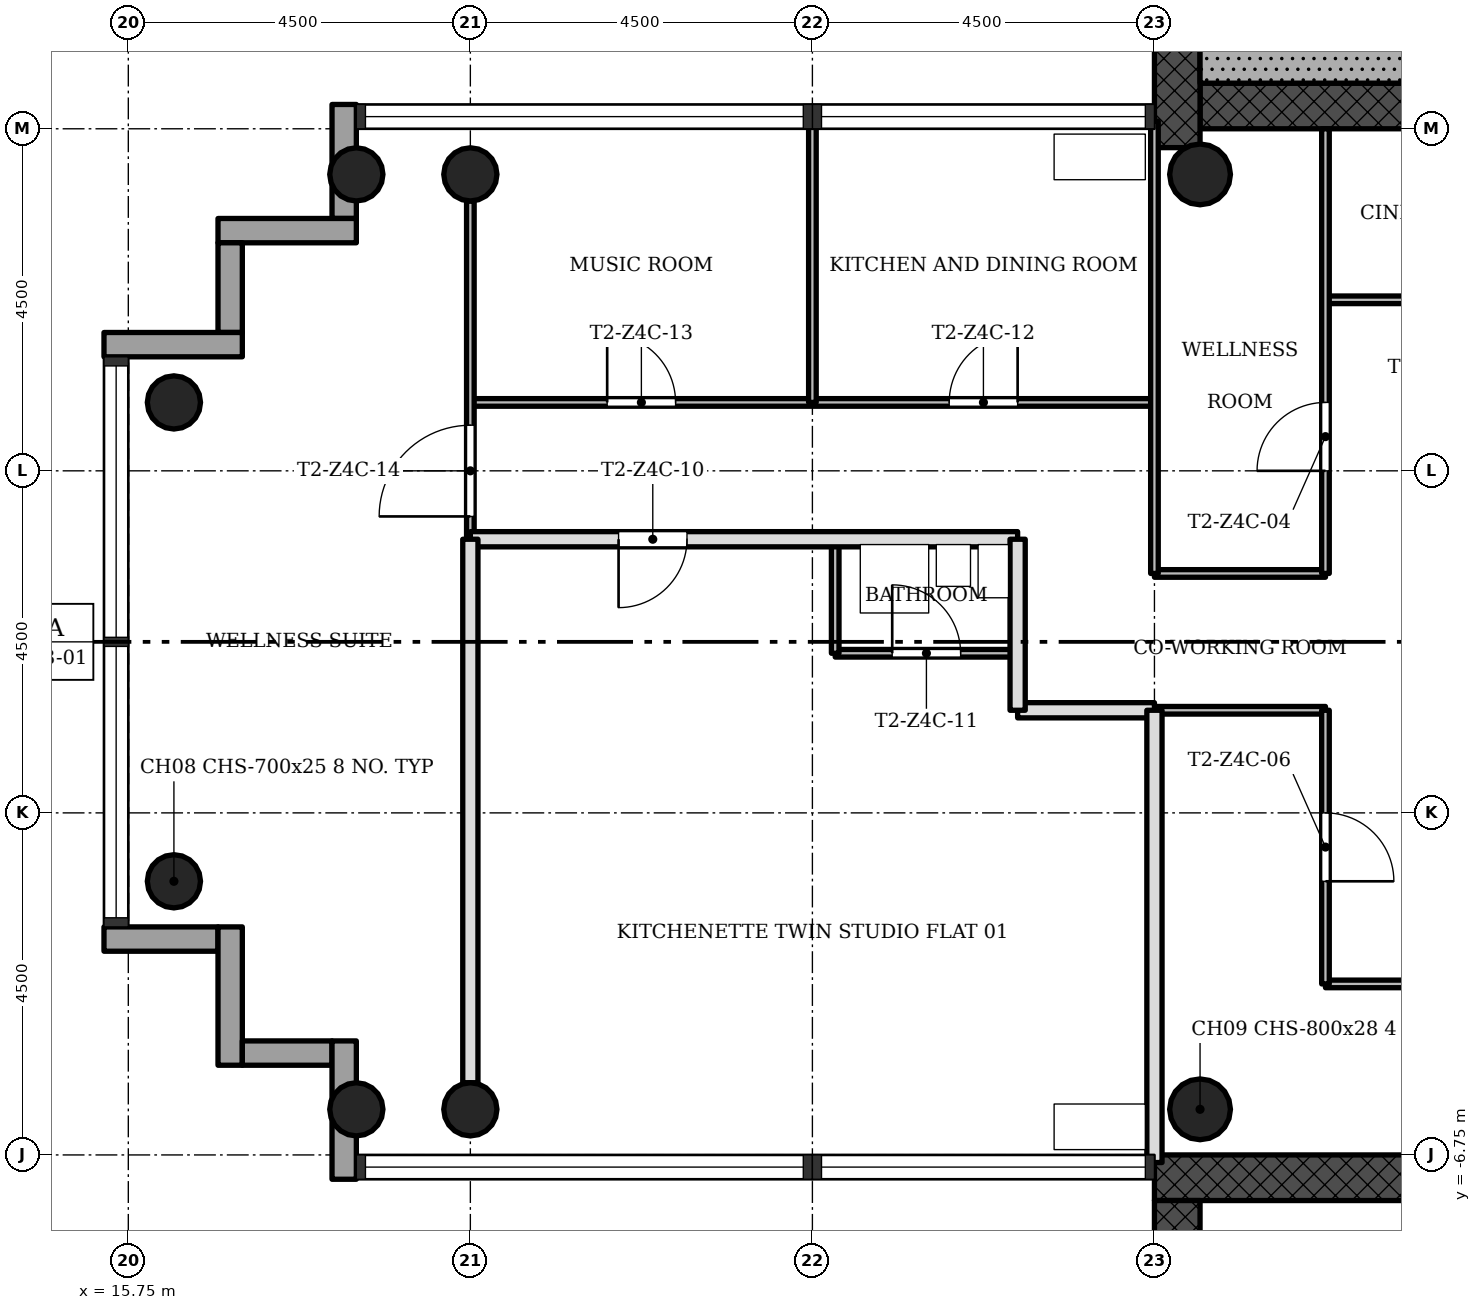
"""IFC4 building model, lengths in metres.
Left out: names, types, materials, properties, quantities, classifications, styles, units other than length and angle.
Written with IfcOpenShell. Run it as: python <this file> out.ifc"""

import sys

from ifc_helpers import new_model, si_unit, direction, frame, frame_2d, origin, origin_2d, place, context, subcontext, project, spatial, rectangle, hollow_circle, extrude, element, fill, save


model = new_model("IFC4")
c1 = context("Model", 3, precision=1e-05, world=origin(), true_north=direction((0.0, 1.0)))
c2 = subcontext(c1, "Body", "Model", "MODEL_VIEW")
j1 = project(units=[si_unit("LENGTHUNIT", "METRE"), si_unit("PLANEANGLEUNIT", "RADIAN")], contexts=[c1])
p1 = place(None, origin())
s1 = spatial("IfcSite", under=j1, at=p1, CompositionType="ELEMENT")
p2 = place(p1, origin())
s2 = spatial("IfcBuilding", under=s1, at=p2, CompositionType="ELEMENT")
p3 = place(p2, frame((0.0, 0.0, 185.8)))
s3 = spatial("IfcBuildingStorey", under=s2, at=p3, CompositionType="ELEMENT", Elevation=185.8)
p4 = place(p3, frame((29.85, 7.05, 0.0), z_axis=(0.0, 0.0, 1.0), x_axis=(1.0, 0.0, 0.0)))
e1 = element("IfcWall", 1, at=p4, inside=s3, PredefinedType="SHEAR", context=c2, shape_type="SweptSolid", body=[
    extrude(rectangle(XDim=12.9, YDim=0.6, at=frame_2d((6.45, 0.0))), origin(), (0.0, 0.0, 1.0), 3.4),
])
p5 = place(p4, frame((5.25, 0.0, 0.0)))
e2 = element("IfcOpeningElement", 2, at=p5, cuts=e1, PredefinedType="OPENING", context=c2, shape_type="SweptSolid", body=[
    extrude(rectangle(XDim=1.8, YDim=2.1, at=frame_2d((0.9, 1.05))), frame((0.0, 0.31, 0.0), z_axis=(0.0, -1.0, 0.0), x_axis=(1.0, 0.0, 0.0)), (0.0, 0.0, 1.0), 0.62),
])
p6 = place(p3, frame((29.55, 15.15, 0.0), z_axis=(0.0, 0.0, 1.0), x_axis=(0.0, -1.0, 0.0)))
e3 = element("IfcWall", 3, at=p6, inside=s3, PredefinedType="SHEAR", context=c2, shape_type="SweptSolid", body=[
    extrude(rectangle(XDim=8.648, YDim=0.6, at=frame_2d((4.324, 0.0))), origin(), (0.0, 0.0, 1.0), 3.4),
])
p7 = place(p3, frame((42.15, -7.05, 0.0), z_axis=(0.0, 0.0, 1.0), x_axis=(-1.0, 0.0, 0.0)))
e4 = element("IfcWall", 4, at=p7, inside=s3, PredefinedType="SHEAR", context=c2, shape_type="SweptSolid", body=[
    extrude(rectangle(XDim=12.9, YDim=0.6, at=frame_2d((6.45, 0.0))), origin(), (0.0, 0.0, 1.0), 3.4),
])
p8 = place(p7, frame((5.25, 0.0, 0.0)))
e5 = element("IfcOpeningElement", 5, at=p8, cuts=e4, PredefinedType="OPENING", context=c2, shape_type="SweptSolid", body=[
    extrude(rectangle(XDim=1.8, YDim=2.1, at=frame_2d((0.9, 1.05))), frame((0.0, 0.31, 0.0), z_axis=(0.0, -1.0, 0.0), x_axis=(1.0, 0.0, 0.0)), (0.0, 0.0, 1.0), 0.62),
])
p9 = place(p3, frame((29.55, -7.35, 0.0), z_axis=(0.0, 0.0, 1.0), x_axis=(0.0, -1.0, 0.0)))
e6 = element("IfcWall", 6, at=p9, inside=s3, PredefinedType="SHEAR", context=c2, shape_type="SweptSolid", body=[
    extrude(rectangle(XDim=8.4, YDim=0.6, at=frame_2d((4.2, 0.0))), origin(), (0.0, 0.0, 1.0), 3.4),
])
for number, where, z_axis, x_axis in (
    (7, (20.25, 6.15, 0.0), (0.0, 0.0, 1.0), (1.0, 0.0, 0.0)),
    (8, (20.25, -6.15, 0.0), (0.0, 0.0, 1.0), (1.0, 0.0, 0.0)),
    (9, (18.75, 6.15, 0.0), (0.0, 0.0, 1.0), (1.0, 0.0, 0.0)),
    (10, (18.75, -6.15, 0.0), (0.0, 0.0, 1.0), (1.0, 0.0, 0.0)),
    (11, (16.35, 3.15, 0.0), (0.0, 0.0, 1.0), (1.0, 0.0, 0.0)),
    (12, (16.35, -3.15, 0.0), (0.0, 0.0, 1.0), (1.0, 0.0, 0.0)),
):
    element("IfcColumn", number, at=place(p3, frame(where, z_axis=z_axis, x_axis=x_axis)), inside=s3, PredefinedType="COLUMN", context=c2, shape_type="SweptSolid", body=[
        extrude(hollow_circle(Radius=0.35, WallThickness=0.025, at=origin_2d()), origin(), (0.0, 0.0, 1.0), 3.4),
    ])
for number, where, z_axis, x_axis in (
    (13, (29.85, 6.15, 0.0), (0.0, 0.0, 1.0), (1.0, 0.0, 0.0)),
    (14, (29.85, -6.15, 0.0), (0.0, 0.0, 1.0), (1.0, 0.0, 0.0)),
):
    element("IfcColumn", number, at=place(p3, frame(where, z_axis=z_axis, x_axis=x_axis)), inside=s3, PredefinedType="COLUMN", context=c2, shape_type="SweptSolid", body=[
        extrude(hollow_circle(Radius=0.4, WallThickness=0.028, at=origin_2d()), origin(), (0.0, 0.0, 1.0), 3.4),
    ])
p10 = place(p3, frame((18.59, 7.07, -0.3), z_axis=(0.0, 0.0, 1.0), x_axis=(0.0, -1.0, 0.0)))
e15 = element("IfcWall", 15, at=p10, inside=s3, PredefinedType="STANDARD", context=c2, shape_type="SweptSolid", body=[
    extrude(rectangle(XDim=1.5, YDim=0.32, at=frame_2d((0.75, 0.0))), origin(), (0.0, 0.0, 1.0), 3.4),
])
p11 = place(p3, frame((18.75, 5.41, -0.3), z_axis=(0.0, 0.0, 1.0), x_axis=(-1.0, 0.0, 0.0)))
e16 = element("IfcWall", 16, at=p11, inside=s3, PredefinedType="STANDARD", context=c2, shape_type="SweptSolid", body=[
    extrude(rectangle(XDim=1.82, YDim=0.32, at=frame_2d((0.91, 0.0))), origin(), (0.0, 0.0, 1.0), 3.4),
])
p12 = place(p3, frame((17.09, 5.25, -0.3), z_axis=(0.0, 0.0, 1.0), x_axis=(0.0, -1.0, 0.0)))
e17 = element("IfcWall", 17, at=p12, inside=s3, PredefinedType="STANDARD", context=c2, shape_type="SweptSolid", body=[
    extrude(rectangle(XDim=1.18, YDim=0.32, at=frame_2d((0.59, 0.0))), origin(), (0.0, 0.0, 1.0), 3.4),
])
p13 = place(p3, frame((17.25, 3.91, -0.3), z_axis=(0.0, 0.0, 1.0), x_axis=(-1.0, 0.0, 0.0)))
e18 = element("IfcWall", 18, at=p13, inside=s3, PredefinedType="STANDARD", context=c2, shape_type="SweptSolid", body=[
    extrude(rectangle(XDim=1.82, YDim=0.32, at=frame_2d((0.91, 0.0))), origin(), (0.0, 0.0, 1.0), 3.4),
])
p14 = place(p3, frame((15.43, -3.91, -0.3), z_axis=(0.0, 0.0, 1.0), x_axis=(1.0, 0.0, 0.0)))
e19 = element("IfcWall", 19, at=p14, inside=s3, PredefinedType="STANDARD", context=c2, shape_type="SweptSolid", body=[
    extrude(rectangle(XDim=1.5, YDim=0.32, at=frame_2d((0.75, 0.0))), origin(), (0.0, 0.0, 1.0), 3.4),
])
p15 = place(p3, frame((17.09, -3.75, -0.3), z_axis=(0.0, 0.0, 1.0), x_axis=(0.0, -1.0, 0.0)))
e20 = element("IfcWall", 20, at=p15, inside=s3, PredefinedType="STANDARD", context=c2, shape_type="SweptSolid", body=[
    extrude(rectangle(XDim=1.82, YDim=0.32, at=frame_2d((0.91, 0.0))), origin(), (0.0, 0.0, 1.0), 3.4),
])
p16 = place(p3, frame((17.25, -5.41, -0.3), z_axis=(0.0, 0.0, 1.0), x_axis=(1.0, 0.0, 0.0)))
e21 = element("IfcWall", 21, at=p16, inside=s3, PredefinedType="STANDARD", context=c2, shape_type="SweptSolid", body=[
    extrude(rectangle(XDim=1.18, YDim=0.32, at=frame_2d((0.59, 0.0))), origin(), (0.0, 0.0, 1.0), 3.4),
])
p17 = place(p3, frame((18.59, -5.25, -0.3), z_axis=(0.0, 0.0, 1.0), x_axis=(0.0, -1.0, 0.0)))
e22 = element("IfcWall", 22, at=p17, inside=s3, PredefinedType="STANDARD", context=c2, shape_type="SweptSolid", body=[
    extrude(rectangle(XDim=1.82, YDim=0.32, at=frame_2d((0.91, 0.0))), origin(), (0.0, 0.0, 1.0), 3.4),
])
p18 = place(p3, frame((34.5, -4.5, 0.0), z_axis=(0.0, 0.0, 1.0), x_axis=(-1.0, 0.0, 0.0)))
e23 = element("IfcWall", 23, at=p18, inside=s3, PredefinedType="PARTITIONING", context=c2, shape_type="SweptSolid", body=[
    extrude(rectangle(XDim=3.0, YDim=0.1, at=frame_2d((1.5, 0.0))), origin(), (0.0, 0.0, 1.0), 3.0),
])
p19 = place(p3, frame((31.5, -0.9, 0.0), z_axis=(0.0, 0.0, 1.0), x_axis=(-1.0, 0.0, 0.0)))
e24 = element("IfcWall", 24, at=p19, inside=s3, PredefinedType="PARTITIONING", context=c2, shape_type="SweptSolid", body=[
    extrude(rectangle(XDim=2.25, YDim=0.1, at=frame_2d((1.125, 0.0))), origin(), (0.0, 0.0, 1.0), 3.0),
])
p20 = place(p3, frame((29.25, -0.9, 0.0), z_axis=(0.0, 0.0, 1.0), x_axis=(-1.0, 0.0, 0.0)))
e25 = element("IfcWall", 25, at=p20, inside=s3, PredefinedType="SOLIDWALL", context=c2, shape_type="SweptSolid", body=[
    extrude(rectangle(XDim=1.8, YDim=0.2, at=frame_2d((0.9, 0.0))), origin(), (0.0, 0.0, 1.0), 3.0),
])
p21 = place(p3, frame((27.45, -0.15, 0.0), z_axis=(0.0, 0.0, 1.0), x_axis=(-1.0, 0.0, 0.0)))
e26 = element("IfcWall", 26, at=p21, inside=s3, PredefinedType="PARTITIONING", context=c2, shape_type="SweptSolid", body=[
    extrude(rectangle(XDim=2.4, YDim=0.1, at=frame_2d((1.2, 0.0))), origin(), (0.0, 0.0, 1.0), 3.0),
])
p22 = place(p21, frame((0.75, 0.0, 0.0)))
e27 = element("IfcOpeningElement", 27, at=p22, cuts=e26, PredefinedType="OPENING", context=c2, shape_type="SweptSolid", body=[
    extrude(rectangle(XDim=0.9, YDim=2.1, at=frame_2d((0.45, 1.05))), frame((0.0, 0.06, 0.0), z_axis=(0.0, -1.0, 0.0), x_axis=(1.0, 0.0, 0.0)), (0.0, 0.0, 1.0), 0.12),
])
p23 = place(p3, frame((31.5, 0.9, 0.0), z_axis=(0.0, 0.0, 1.0), x_axis=(-1.0, 0.0, 0.0)))
e28 = element("IfcWall", 28, at=p23, inside=s3, PredefinedType="PARTITIONING", context=c2, shape_type="SweptSolid", body=[
    extrude(rectangle(XDim=2.25, YDim=0.1, at=frame_2d((1.125, 0.0))), origin(), (0.0, 0.0, 1.0), 3.0),
])
p24 = place(p3, frame((27.45, 1.35, 0.0), z_axis=(0.0, 0.0, 1.0), x_axis=(-1.0, 0.0, 0.0)))
e29 = element("IfcWall", 29, at=p24, inside=s3, PredefinedType="SOLIDWALL", context=c2, shape_type="SweptSolid", body=[
    extrude(rectangle(XDim=7.2, YDim=0.2, at=frame_2d((3.6, 0.0))), origin(), (0.0, 0.0, 1.0), 3.0),
])
p25 = place(p24, frame((4.35, 0.0, 0.0)))
e30 = element("IfcOpeningElement", 30, at=p25, cuts=e29, PredefinedType="OPENING", context=c2, shape_type="SweptSolid", body=[
    extrude(rectangle(XDim=0.9, YDim=2.1, at=frame_2d((0.45, 1.05))), frame((0.0, 0.11, 0.0), z_axis=(0.0, -1.0, 0.0), x_axis=(1.0, 0.0, 0.0)), (0.0, 0.0, 1.0), 0.22),
])
p26 = place(p3, frame((29.25, 3.15, 0.0), z_axis=(0.0, 0.0, 1.0), x_axis=(-1.0, 0.0, 0.0)))
e31 = element("IfcWall", 31, at=p26, inside=s3, PredefinedType="PARTITIONING", context=c2, shape_type="SweptSolid", body=[
    extrude(rectangle(XDim=9.0, YDim=0.1, at=frame_2d((4.5, 0.0))), origin(), (0.0, 0.0, 1.0), 3.0),
])
p27 = place(p26, frame((1.8, 0.0, 0.0)))
e32 = element("IfcOpeningElement", 32, at=p27, cuts=e31, PredefinedType="OPENING", context=c2, shape_type="SweptSolid", body=[
    extrude(rectangle(XDim=0.9, YDim=2.1, at=frame_2d((0.45, 1.05))), frame((0.0, 0.06, 0.0), z_axis=(0.0, -1.0, 0.0), x_axis=(1.0, 0.0, 0.0)), (0.0, 0.0, 1.0), 0.12),
])
p28 = place(p26, frame((6.3, 0.0, 0.0)))
e33 = element("IfcOpeningElement", 33, at=p28, cuts=e31, PredefinedType="OPENING", context=c2, shape_type="SweptSolid", body=[
    extrude(rectangle(XDim=0.9, YDim=2.1, at=frame_2d((0.45, 1.05))), frame((0.0, 0.06, 0.0), z_axis=(0.0, -1.0, 0.0), x_axis=(1.0, 0.0, 0.0)), (0.0, 0.0, 1.0), 0.12),
])
p29 = place(p3, frame((34.5, 4.5, 0.0), z_axis=(0.0, 0.0, 1.0), x_axis=(-1.0, 0.0, 0.0)))
e34 = element("IfcWall", 34, at=p29, inside=s3, PredefinedType="PARTITIONING", context=c2, shape_type="SweptSolid", body=[
    extrude(rectangle(XDim=3.0, YDim=0.1, at=frame_2d((1.5, 0.0))), origin(), (0.0, 0.0, 1.0), 3.0),
])
p30 = place(p29, frame((1.05, 0.0, 0.0)))
e35 = element("IfcOpeningElement", 35, at=p30, cuts=e34, PredefinedType="OPENING", context=c2, shape_type="SweptSolid", body=[
    extrude(rectangle(XDim=0.9, YDim=2.1, at=frame_2d((0.45, 1.05))), frame((0.0, 0.06, 0.0), z_axis=(0.0, -1.0, 0.0), x_axis=(1.0, 0.0, 0.0)), (0.0, 0.0, 1.0), 0.12),
])
p31 = place(p3, frame((31.5, -4.5, 0.0), z_axis=(0.0, 0.0, 1.0), x_axis=(0.0, 1.0, 0.0)))
e36 = element("IfcWall", 36, at=p31, inside=s3, PredefinedType="PARTITIONING", context=c2, shape_type="SweptSolid", body=[
    extrude(rectangle(XDim=3.6, YDim=0.1, at=frame_2d((1.8, 0.0))), origin(), (0.0, 0.0, 1.0), 3.0),
])
p32 = place(p31, frame((1.35, 0.0, 0.0)))
e37 = element("IfcOpeningElement", 37, at=p32, cuts=e36, PredefinedType="OPENING", context=c2, shape_type="SweptSolid", body=[
    extrude(rectangle(XDim=0.9, YDim=2.1, at=frame_2d((0.45, 1.05))), frame((0.0, 0.06, 0.0), z_axis=(0.0, -1.0, 0.0), x_axis=(1.0, 0.0, 0.0)), (0.0, 0.0, 1.0), 0.12),
])
p33 = place(p3, frame((31.5, 0.9, 0.0), z_axis=(0.0, 0.0, 1.0), x_axis=(0.0, 1.0, 0.0)))
e38 = element("IfcWall", 38, at=p33, inside=s3, PredefinedType="PARTITIONING", context=c2, shape_type="SweptSolid", body=[
    extrude(rectangle(XDim=5.85, YDim=0.1, at=frame_2d((2.925, 0.0))), origin(), (0.0, 0.0, 1.0), 3.0),
])
p34 = place(p33, frame((1.35, 0.0, 0.0)))
e39 = element("IfcOpeningElement", 39, at=p34, cuts=e38, PredefinedType="OPENING", context=c2, shape_type="SweptSolid", body=[
    extrude(rectangle(XDim=0.9, YDim=2.1, at=frame_2d((0.45, 1.05))), frame((0.0, 0.06, 0.0), z_axis=(0.0, -1.0, 0.0), x_axis=(1.0, 0.0, 0.0)), (0.0, 0.0, 1.0), 0.12),
])
p35 = place(p3, frame((29.25, 0.9, 0.0), z_axis=(0.0, 0.0, 1.0), x_axis=(0.0, 1.0, 0.0)))
e40 = element("IfcWall", 40, at=p35, inside=s3, PredefinedType="PARTITIONING", context=c2, shape_type="SweptSolid", body=[
    extrude(rectangle(XDim=5.95, YDim=0.1, at=frame_2d((2.975, 0.0))), origin(), (0.0, 0.0, 1.0), 3.0),
])
p36 = place(p3, frame((29.25, -6.85, 0.0), z_axis=(0.0, 0.0, 1.0), x_axis=(0.0, 1.0, 0.0)))
e41 = element("IfcWall", 41, at=p36, inside=s3, PredefinedType="SOLIDWALL", context=c2, shape_type="SweptSolid", body=[
    extrude(rectangle(XDim=5.95, YDim=0.2, at=frame_2d((2.975, 0.0))), origin(), (0.0, 0.0, 1.0), 3.0),
])
p37 = place(p3, frame((27.45, -0.9, 0.0), z_axis=(0.0, 0.0, 1.0), x_axis=(0.0, 1.0, 0.0)))
e42 = element("IfcWall", 42, at=p37, inside=s3, PredefinedType="SOLIDWALL", context=c2, shape_type="SweptSolid", body=[
    extrude(rectangle(XDim=2.25, YDim=0.2, at=frame_2d((1.125, 0.0))), origin(), (0.0, 0.0, 1.0), 3.0),
])
p38 = place(p3, frame((25.05, -0.15, 0.0), z_axis=(0.0, 0.0, 1.0), x_axis=(0.0, 1.0, 0.0)))
e43 = element("IfcWall", 43, at=p38, inside=s3, PredefinedType="PARTITIONING", context=c2, shape_type="SweptSolid", body=[
    extrude(rectangle(XDim=1.5, YDim=0.1, at=frame_2d((0.75, 0.0))), origin(), (0.0, 0.0, 1.0), 3.0),
])
p39 = place(p3, frame((24.75, 3.15, 0.0), z_axis=(0.0, 0.0, 1.0), x_axis=(0.0, 1.0, 0.0)))
e44 = element("IfcWall", 44, at=p39, inside=s3, PredefinedType="PARTITIONING", context=c2, shape_type="SweptSolid", body=[
    extrude(rectangle(XDim=3.7, YDim=0.1, at=frame_2d((1.85, 0.0))), origin(), (0.0, 0.0, 1.0), 3.0),
])
p40 = place(p3, frame((20.25, 1.35, 0.0), z_axis=(0.0, 0.0, 1.0), x_axis=(0.0, 1.0, 0.0)))
e45 = element("IfcWall", 45, at=p40, inside=s3, PredefinedType="PARTITIONING", context=c2, shape_type="SweptSolid", body=[
    extrude(rectangle(XDim=4.45, YDim=0.1, at=frame_2d((2.225, 0.0))), origin(), (0.0, 0.0, 1.0), 3.0),
])
p41 = place(p40, frame((0.3, 0.0, 0.0)))
e46 = element("IfcOpeningElement", 46, at=p41, cuts=e45, PredefinedType="OPENING", context=c2, shape_type="SweptSolid", body=[
    extrude(rectangle(XDim=1.2, YDim=2.1, at=frame_2d((0.6, 1.05))), frame((0.0, 0.06, 0.0), z_axis=(0.0, -1.0, 0.0), x_axis=(1.0, 0.0, 0.0)), (0.0, 0.0, 1.0), 0.12),
])
p42 = place(p3, frame((20.25, -5.8, 0.0), z_axis=(0.0, 0.0, 1.0), x_axis=(0.0, 1.0, 0.0)))
e47 = element("IfcWall", 47, at=p42, inside=s3, PredefinedType="SOLIDWALL", context=c2, shape_type="SweptSolid", body=[
    extrude(rectangle(XDim=7.15, YDim=0.2, at=frame_2d((3.575, 0.0))), origin(), (0.0, 0.0, 1.0), 3.0),
])
p43 = place(p3, frame((34.15, 7.65, 0.0), z_axis=(0.0, 0.0, 1.0), x_axis=(-1.0, 0.0, 0.0)))
e48 = element("IfcWall", 48, at=p43, inside=s3, PredefinedType="SHEAR", context=c2, shape_type="SweptSolid", body=[
    extrude(rectangle(XDim=4.3, YDim=0.6, at=frame_2d((2.15, 0.0))), origin(), (0.0, 0.0, 1.0), 3.4),
])
p44 = place(p34, origin())
e49 = element("IfcDoor", 49, at=p44, inside=s3, OperationType="SINGLE_SWING_RIGHT", PredefinedType="DOOR", context=c2, shape_type="SweptSolid", body=[
    extrude(rectangle(XDim=0.9, YDim=2.1, at=frame_2d((0.45, 1.05))), frame((0.0, 0.025, 0.0), z_axis=(0.0, -1.0, 0.0), x_axis=(1.0, 0.0, 0.0)), (0.0, 0.0, 1.0), 0.05),
])
fill(e39, e49)
p45 = place(p32, origin())
e50 = element("IfcDoor", 50, at=p45, inside=s3, OperationType="SINGLE_SWING_LEFT", PredefinedType="DOOR", context=c2, shape_type="SweptSolid", body=[
    extrude(rectangle(XDim=0.9, YDim=2.1, at=frame_2d((0.45, 1.05))), frame((0.0, 0.025, 0.0), z_axis=(0.0, -1.0, 0.0), x_axis=(1.0, 0.0, 0.0)), (0.0, 0.0, 1.0), 0.05),
])
fill(e37, e50)
p46 = place(p25, origin())
e51 = element("IfcDoor", 51, at=p46, inside=s3, OperationType="SINGLE_SWING_LEFT", PredefinedType="DOOR", context=c2, shape_type="SweptSolid", body=[
    extrude(rectangle(XDim=0.9, YDim=2.1, at=frame_2d((0.45, 1.05))), frame((0.0, 0.025, 0.0), z_axis=(0.0, -1.0, 0.0), x_axis=(1.0, 0.0, 0.0)), (0.0, 0.0, 1.0), 0.05),
])
fill(e30, e51)
p47 = place(p22, origin())
e52 = element("IfcDoor", 52, at=p47, inside=s3, OperationType="SINGLE_SWING_RIGHT", PredefinedType="DOOR", context=c2, shape_type="SweptSolid", body=[
    extrude(rectangle(XDim=0.9, YDim=2.1, at=frame_2d((0.45, 1.05))), frame((0.0, 0.025, 0.0), z_axis=(0.0, -1.0, 0.0), x_axis=(1.0, 0.0, 0.0)), (0.0, 0.0, 1.0), 0.05),
])
fill(e27, e52)
p48 = place(p27, origin())
e53 = element("IfcDoor", 53, at=p48, inside=s3, OperationType="SINGLE_SWING_LEFT", PredefinedType="DOOR", context=c2, shape_type="SweptSolid", body=[
    extrude(rectangle(XDim=0.9, YDim=2.1, at=frame_2d((0.45, 1.05))), frame((0.0, 0.025, 0.0), z_axis=(0.0, -1.0, 0.0), x_axis=(1.0, 0.0, 0.0)), (0.0, 0.0, 1.0), 0.05),
])
fill(e32, e53)
p49 = place(p28, origin())
e54 = element("IfcDoor", 54, at=p49, inside=s3, OperationType="SINGLE_SWING_RIGHT", PredefinedType="DOOR", context=c2, shape_type="SweptSolid", body=[
    extrude(rectangle(XDim=0.9, YDim=2.1, at=frame_2d((0.45, 1.05))), frame((0.0, 0.025, 0.0), z_axis=(0.0, -1.0, 0.0), x_axis=(1.0, 0.0, 0.0)), (0.0, 0.0, 1.0), 0.05),
])
fill(e33, e54)
p50 = place(p41, origin())
e55 = element("IfcDoor", 55, at=p50, inside=s3, OperationType="SINGLE_SWING_RIGHT", PredefinedType="DOOR", context=c2, shape_type="SweptSolid", body=[
    extrude(rectangle(XDim=1.2, YDim=2.1, at=frame_2d((0.6, 1.05))), frame((0.0, 0.025, 0.0), z_axis=(0.0, -1.0, 0.0), x_axis=(1.0, 0.0, 0.0)), (0.0, 0.0, 1.0), 0.05),
])
fill(e46, e55)
save(model, sys.argv[1])
